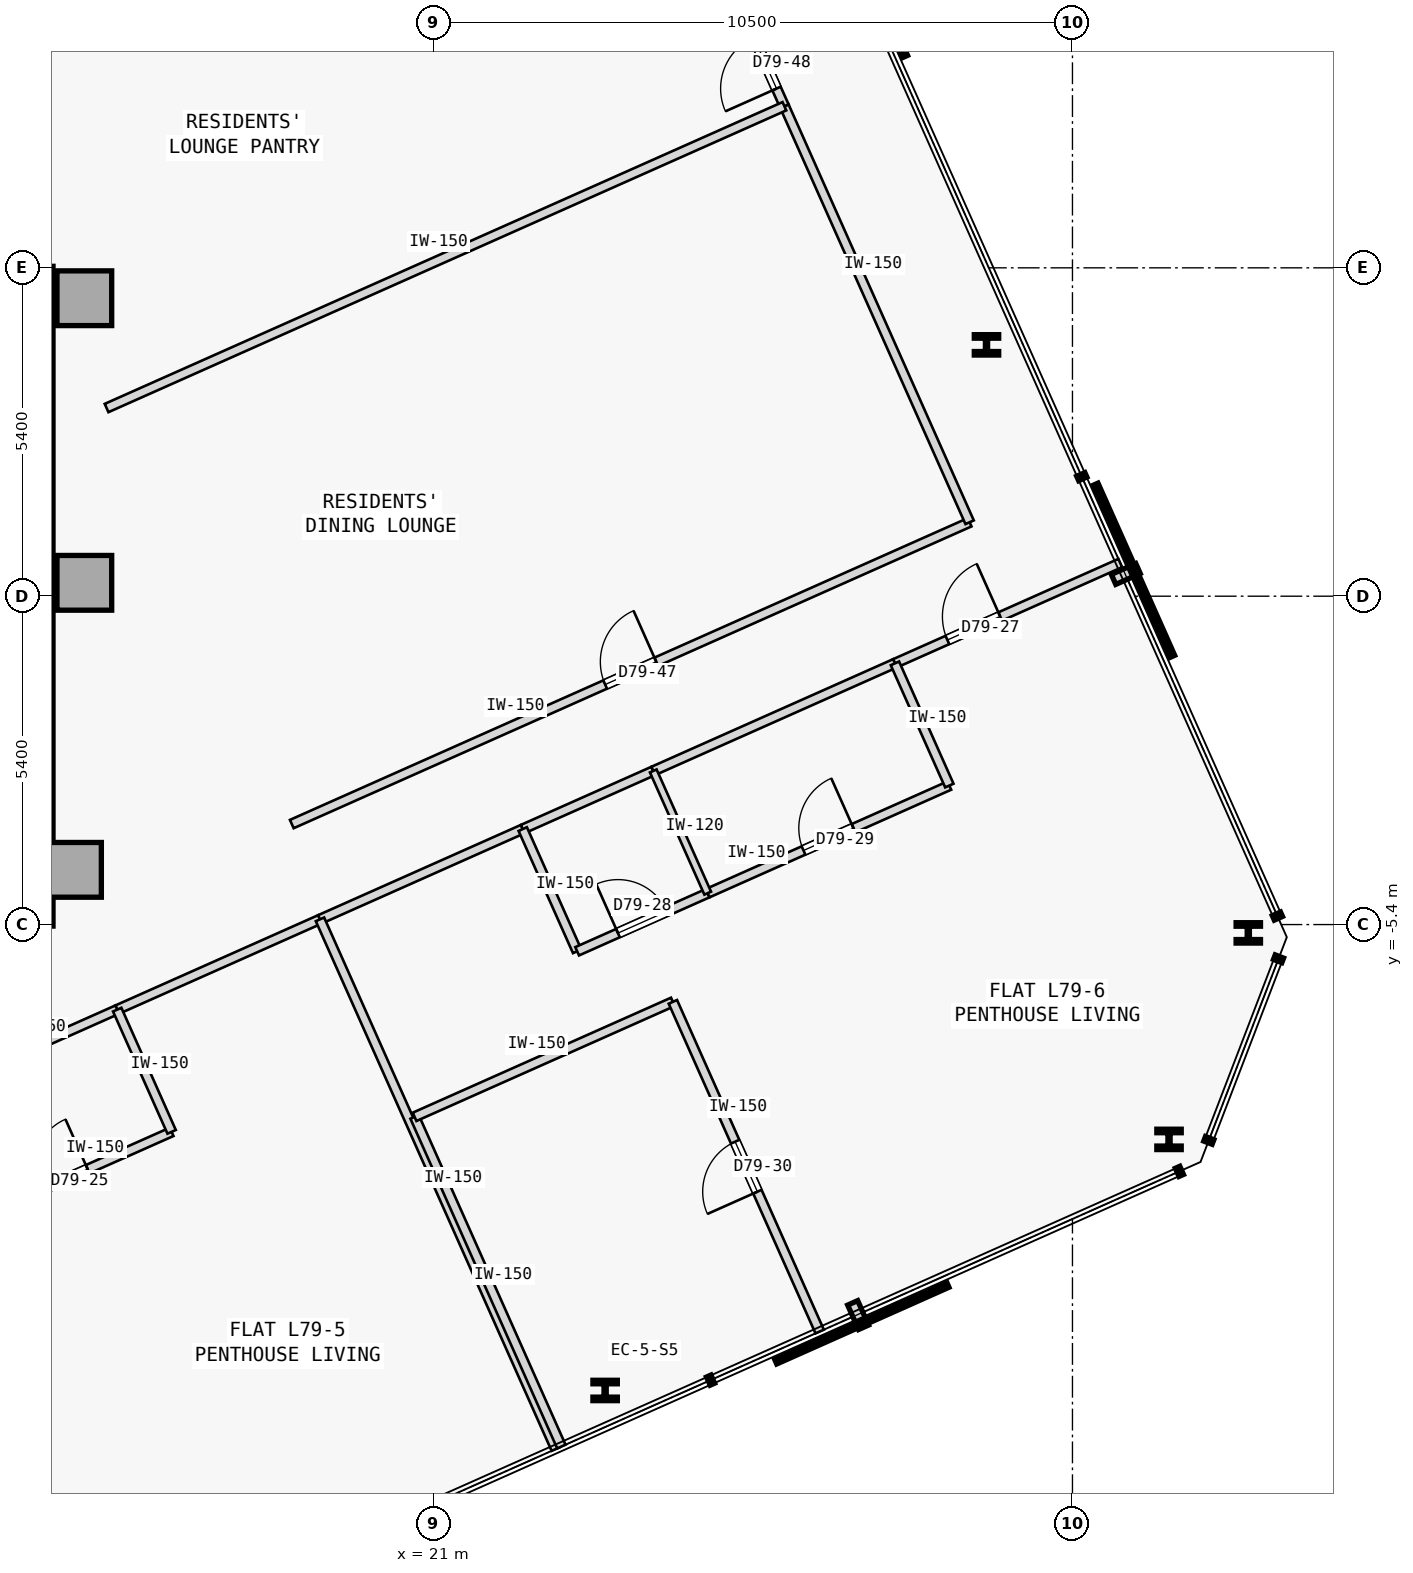
"""IFC4 building model, lengths in metres.
Left out: names, types, materials, properties, quantities, classifications, styles, units other than length and angle.
Written with IfcOpenShell. Run it as: python <this file> out.ifc"""

import sys

from ifc_helpers import new_model, si_unit, direction, frame, frame_2d, origin, origin_2d, place, context, subcontext, project, spatial, rectangle, i_section, extrude, element, fill, save


model = new_model("IFC4")
c1 = context("Model", 3, precision=1e-05, world=origin(), true_north=direction((0.0, 1.0)))
c2 = subcontext(c1, "Body", "Model", "MODEL_VIEW")
j1 = project(units=[si_unit("LENGTHUNIT", "METRE"), si_unit("PLANEANGLEUNIT", "RADIAN")], contexts=[c1])
p1 = place(None, origin())
s1 = spatial("IfcSite", under=j1, at=p1, CompositionType="ELEMENT")
p2 = place(p1, origin())
s2 = spatial("IfcBuilding", under=s1, at=p2, CompositionType="ELEMENT")
p3 = place(p2, frame((0.0, 0.0, 295.3)))
s3 = spatial("IfcBuildingStorey", under=s2, at=p3, CompositionType="ELEMENT", Elevation=295.3)
for number, where, z_axis, x_axis in (
    (1, (15.25, 4.9, 0.0), (0.0, 0.0, 1.0), (1.0, 0.0, 0.0)),
    (2, (15.25, 0.22, 0.0), (0.0, 0.0, 1.0), (1.0, 0.0, 0.0)),
    (3, (15.08, -4.5, 0.0), (0.0, 0.0, 1.0), (1.0, 0.0, 0.0)),
):
    element("IfcColumn", number, at=place(p3, frame(where, z_axis=z_axis, x_axis=x_axis)), inside=s3, PredefinedType="COLUMN", context=c2, shape_type="SweptSolid", body=[
        extrude(rectangle(XDim=0.9, YDim=0.9, at=origin_2d()), origin(), (0.0, 0.0, 1.0), 3.35),
    ])
p4 = place(p3, frame((14.56, -5.425, 0.0), z_axis=(0.0, 0.0, 1.0), x_axis=(0.0, 1.0, 0.0)))
e4 = element("IfcWall", 4, at=p4, inside=s3, PredefinedType="SHEAR", context=c2, shape_type="SweptSolid", body=[
    extrude(rectangle(XDim=10.85, YDim=0.35, at=frame_2d((5.425, 0.0))), origin(), (0.0, 0.0, 1.0), 3.125),
])
for number, where, z_axis, x_axis in (
    (5, (23.814, -13.062, 0.0), (0.0, 0.0, 1.0), (1.0, 0.0, 0.0)),
    (6, (33.088, -8.933, 0.0), (0.0, 0.0, 1.0), (1.0, 0.0, 0.0)),
    (7, (34.392, -5.537, 0.0), (0.0, 0.0, 1.0), (1.0, 0.0, 0.0)),
    (8, (30.086, 4.133, 0.0), (0.0, 0.0, 1.0), (1.0, 0.0, 0.0)),
):
    element("IfcColumn", number, at=place(p3, frame(where, z_axis=z_axis, x_axis=x_axis)), inside=s3, PredefinedType="COLUMN", context=c2, shape_type="SweptSolid", body=[
        extrude(i_section(OverallWidth=0.401, OverallDepth=0.335, WebThickness=0.036, FlangeThickness=0.058, FilletRadius=0.015, at=origin_2d()), origin(), (0.0, 0.0, 1.0), 3.35),
    ])
p5 = place(p3, frame((15.791, -6.799, 0.0), z_axis=(0.0, 0.0, 1.0), x_axis=(0.913543802, 0.40674036169, 0.0)))
e9 = element("IfcWall", 9, at=p5, inside=s3, PredefinedType="PARTITIONING", context=c2, shape_type="SweptSolid", body=[
    extrude(rectangle(XDim=3.65, YDim=0.15, at=frame_2d((1.825, 0.0))), origin(), (0.0, 0.0, 1.0), 3.125),
])
p6 = place(p3, frame((12.208, -8.394, 0.0), z_axis=(0.0, 0.0, 1.0), x_axis=(0.913539234326, 0.406750620585, 0.0)))
e10 = element("IfcWall", 10, at=p6, inside=s3, PredefinedType="PARTITIONING", context=c2, shape_type="SweptSolid", body=[
    extrude(rectangle(XDim=3.922, YDim=0.15, at=frame_2d((1.961, 0.0))), origin(), (0.0, 0.0, 1.0), 3.125),
])
p7 = place(p3, frame((19.125, -5.314, 0.0), z_axis=(0.0, 0.0, 1.0), x_axis=(0.913543802, 0.40674036169, 0.0)))
e11 = element("IfcWall", 11, at=p7, inside=s3, PredefinedType="PARTITIONING", context=c2, shape_type="SweptSolid", body=[
    extrude(rectangle(XDim=3.65, YDim=0.15, at=frame_2d((1.825, 0.0))), origin(), (0.0, 0.0, 1.0), 3.125),
])
p8 = place(p3, frame((28.581, -1.104, 0.0), z_axis=(0.0, 0.0, 1.0), x_axis=(0.91352836412, 0.406775033585, 0.0)))
e12 = element("IfcWall", 12, at=p8, inside=s3, PredefinedType="PARTITIONING", context=c2, shape_type="SweptSolid", body=[
    extrude(rectangle(XDim=4.056, YDim=0.15, at=frame_2d((2.028, 0.0))), origin(), (0.0, 0.0, 1.0), 3.125),
])
p9 = place(p8, frame((0.945, 0.0, 0.0)))
e13 = element("IfcOpeningElement", 13, at=p9, cuts=e12, PredefinedType="OPENING", context=c2, shape_type="SweptSolid", body=[
    extrude(rectangle(XDim=0.95, YDim=2.15, at=frame_2d((0.475, 1.075))), frame((0.0, 0.085, 0.0), z_axis=(0.0, -1.0, 0.0), x_axis=(1.0, 0.0, 0.0)), (0.0, 0.0, 1.0), 0.17),
])
p10 = place(p3, frame((22.46, -3.83, 0.0), z_axis=(0.0, 0.0, 1.0), x_axis=(0.913541436194, 0.406745675276, 0.0)))
e14 = element("IfcWall", 14, at=p10, inside=s3, PredefinedType="PARTITIONING", context=c2, shape_type="SweptSolid", body=[
    extrude(rectangle(XDim=2.35, YDim=0.15, at=frame_2d((1.175, 0.0))), origin(), (0.0, 0.0, 1.0), 3.125),
])
p11 = place(p3, frame((24.606, -2.874, 0.0), z_axis=(0.0, 0.0, 1.0), x_axis=(0.913554477336, 0.406716383908, 0.0)))
e15 = element("IfcWall", 15, at=p11, inside=s3, PredefinedType="PARTITIONING", context=c2, shape_type="SweptSolid", body=[
    extrude(rectangle(XDim=4.35, YDim=0.15, at=frame_2d((2.175, 0.0))), origin(), (0.0, 0.0, 1.0), 3.125),
])
p12 = place(p3, frame((18.662, -3.747, 0.0), z_axis=(0.0, 0.0, 1.0), x_axis=(0.91353989142, 0.406749144787, 0.0)))
e16 = element("IfcWall", 16, at=p12, inside=s3, PredefinedType="PARTITIONING", context=c2, shape_type="SweptSolid", body=[
    extrude(rectangle(XDim=12.202, YDim=0.15, at=frame_2d((6.101, 0.0))), origin(), (0.0, 0.0, 1.0), 3.125),
])
p13 = place(p12, frame((5.641, 0.0, 0.0)))
e17 = element("IfcOpeningElement", 17, at=p13, cuts=e16, PredefinedType="OPENING", context=c2, shape_type="SweptSolid", body=[
    extrude(rectangle(XDim=0.92, YDim=2.15, at=frame_2d((0.46, 1.075))), frame((0.0, 0.085, 0.0), z_axis=(0.0, -1.0, 0.0), x_axis=(1.0, 0.0, 0.0)), (0.0, 0.0, 1.0), 0.17),
])
p14 = place(p3, frame((29.809, 1.216, 0.0), z_axis=(0.0, 0.0, 1.0), x_axis=(-0.406719136744, 0.913553251763, 0.0)))
e18 = element("IfcWall", 18, at=p14, inside=s3, PredefinedType="PARTITIONING", context=c2, shape_type="SweptSolid", body=[
    extrude(rectangle(XDim=7.489, YDim=0.15, at=frame_2d((3.745, 0.0))), origin(), (0.0, 0.0, 1.0), 3.125),
])
p15 = place(p3, frame((26.763, 8.057, 0.0), z_axis=(0.0, 0.0, 1.0), x_axis=(-0.406851688687, 0.913494227356, 0.0)))
e19 = element("IfcWall", 19, at=p15, inside=s3, PredefinedType="PARTITIONING", context=c2, shape_type="SweptSolid", body=[
    extrude(rectangle(XDim=1.556, YDim=0.15, at=frame_2d((0.778, 0.0))), origin(), (0.0, 0.0, 1.0), 3.125),
])
p16 = place(p15, frame((0.318, 0.0, 0.0)))
e20 = element("IfcOpeningElement", 20, at=p16, cuts=e19, PredefinedType="OPENING", context=c2, shape_type="SweptSolid", body=[
    extrude(rectangle(XDim=0.92, YDim=2.15, at=frame_2d((0.46, 1.075))), frame((0.0, 0.085, 0.0), z_axis=(0.0, -1.0, 0.0), x_axis=(1.0, 0.0, 0.0)), (0.0, 0.0, 1.0), 0.17),
])
p17 = place(p3, frame((13.103, -10.404, 0.0), z_axis=(0.0, 0.0, 1.0), x_axis=(0.913549532696, 0.406727490232, 0.0)))
e21 = element("IfcWall", 21, at=p17, inside=s3, PredefinedType="PARTITIONING", context=c2, shape_type="SweptSolid", body=[
    extrude(rectangle(XDim=3.922, YDim=0.15, at=frame_2d((1.961, 0.0))), origin(), (0.0, 0.0, 1.0), 3.125),
])
p18 = place(p17, frame((1.511, 0.0, 0.0)))
e22 = element("IfcOpeningElement", 22, at=p18, cuts=e21, PredefinedType="OPENING", context=c2, shape_type="SweptSolid", body=[
    extrude(rectangle(XDim=0.9, YDim=2.15, at=frame_2d((0.45, 1.075))), frame((0.0, 0.085, 0.0), z_axis=(0.0, -1.0, 0.0), x_axis=(1.0, 0.0, 0.0)), (0.0, 0.0, 1.0), 0.17),
])
p19 = place(p3, frame((16.686, -8.809, 0.0), z_axis=(0.0, 0.0, 1.0), x_axis=(-0.406817905151, 0.913509273105, 0.0)))
e23 = element("IfcWall", 23, at=p19, inside=s3, PredefinedType="PARTITIONING", context=c2, shape_type="SweptSolid", body=[
    extrude(rectangle(XDim=2.2, YDim=0.15, at=frame_2d((1.1, 0.0))), origin(), (0.0, 0.0, 1.0), 3.125),
])
p20 = place(p3, frame((14.944, -17.613, 0.0), z_axis=(0.0, 0.0, 1.0), x_axis=(-0.406714717734, 0.913555219119, 0.0)))
e24 = element("IfcWall", 24, at=p20, inside=s3, PredefinedType="PARTITIONING", context=c2, shape_type="SweptSolid", body=[
    extrude(rectangle(XDim=5.935, YDim=0.15, at=frame_2d((2.967, 0.0))), origin(), (0.0, 0.0, 1.0), 2.675),
])
p21 = place(p20, frame((2.518, 0.0, 0.0)))
e25 = element("IfcOpeningElement", 25, at=p21, cuts=e24, PredefinedType="OPENING", context=c2, shape_type="SweptSolid", body=[
    extrude(rectangle(XDim=0.9, YDim=2.15, at=frame_2d((0.45, 1.075))), frame((0.0, 0.085, 0.0), z_axis=(0.0, -1.0, 0.0), x_axis=(1.0, 0.0, 0.0)), (0.0, 0.0, 1.0), 0.17),
])
p22 = place(p3, frame((23.003, -14.025, 0.0), z_axis=(0.0, 0.0, 1.0), x_axis=(-0.406729927653, 0.913548447512, 0.0)))
e26 = element("IfcWall", 26, at=p22, inside=s3, PredefinedType="PARTITIONING", context=c2, shape_type="SweptSolid", body=[
    extrude(rectangle(XDim=9.535, YDim=0.15, at=frame_2d((4.768, 0.0))), origin(), (0.0, 0.0, 1.0), 3.125),
])
p23 = place(p3, frame((23.354, -5.839, 0.0), z_axis=(0.0, 0.0, 1.0), x_axis=(-0.406725294076, 0.913550510459, 0.0)))
e27 = element("IfcWall", 27, at=p23, inside=s3, PredefinedType="PARTITIONING", context=c2, shape_type="SweptSolid", body=[
    extrude(rectangle(XDim=2.2, YDim=0.15, at=frame_2d((1.1, 0.0))), origin(), (0.0, 0.0, 1.0), 3.125),
])
p24 = place(p3, frame((23.354, -5.839, 0.0), z_axis=(0.0, 0.0, 1.0), x_axis=(0.913558622212, 0.406707073682, 0.0)))
e28 = element("IfcWall", 28, at=p24, inside=s3, PredefinedType="PARTITIONING", context=c2, shape_type="SweptSolid", body=[
    extrude(rectangle(XDim=2.35, YDim=0.15, at=frame_2d((1.175, 0.0))), origin(), (0.0, 0.0, 1.0), 3.125),
])
p25 = place(p24, frame((0.735, 0.0, 0.0)))
e29 = element("IfcOpeningElement", 29, at=p25, cuts=e28, PredefinedType="OPENING", context=c2, shape_type="SweptSolid", body=[
    extrude(rectangle(XDim=0.88, YDim=2.15, at=frame_2d((0.44, 1.075))), frame((0.0, 0.085, 0.0), z_axis=(0.0, -1.0, 0.0), x_axis=(1.0, 0.0, 0.0)), (0.0, 0.0, 1.0), 0.17),
])
p26 = place(p3, frame((25.501, -4.884, 0.0), z_axis=(0.0, 0.0, 1.0), x_axis=(0.913545193015, 0.406737237438, 0.0)))
e30 = element("IfcWall", 30, at=p26, inside=s3, PredefinedType="PARTITIONING", context=c2, shape_type="SweptSolid", body=[
    extrude(rectangle(XDim=4.35, YDim=0.15, at=frame_2d((2.175, 0.0))), origin(), (0.0, 0.0, 1.0), 3.125),
])
p27 = place(p26, frame((1.725, 0.0, 0.0)))
e31 = element("IfcOpeningElement", 31, at=p27, cuts=e30, PredefinedType="OPENING", context=c2, shape_type="SweptSolid", body=[
    extrude(rectangle(XDim=0.9, YDim=2.15, at=frame_2d((0.45, 1.075))), frame((0.0, 0.085, 0.0), z_axis=(0.0, -1.0, 0.0), x_axis=(1.0, 0.0, 0.0)), (0.0, 0.0, 1.0), 0.17),
])
p28 = place(p3, frame((29.475, -3.114, 0.0), z_axis=(0.0, 0.0, 1.0), x_axis=(-0.406725294076, 0.913550510459, 0.0)))
e32 = element("IfcWall", 32, at=p28, inside=s3, PredefinedType="PARTITIONING", context=c2, shape_type="SweptSolid", body=[
    extrude(rectangle(XDim=2.2, YDim=0.15, at=frame_2d((1.1, 0.0))), origin(), (0.0, 0.0, 1.0), 3.125),
])
p29 = place(p3, frame((23.095, -13.984, 0.0), z_axis=(0.0, 0.0, 1.0), x_axis=(-0.406749048544, 0.913539934271, 0.0)))
e33 = element("IfcWall", 33, at=p29, inside=s3, PredefinedType="PARTITIONING", context=c2, shape_type="SweptSolid", body=[
    extrude(rectangle(XDim=5.935, YDim=0.15, at=frame_2d((2.968, 0.0))), origin(), (0.0, 0.0, 1.0), 3.125),
])
p30 = place(p3, frame((20.681, -8.562, 0.0), z_axis=(0.0, 0.0, 1.0), x_axis=(0.91354505039, 0.40673755778, 0.0)))
e34 = element("IfcWall", 34, at=p30, inside=s3, PredefinedType="PARTITIONING", context=c2, shape_type="SweptSolid", body=[
    extrude(rectangle(XDim=4.65, YDim=0.15, at=frame_2d((2.325, 0.0))), origin(), (0.0, 0.0, 1.0), 3.125),
])
p31 = place(p3, frame((27.343, -12.093, 0.0), z_axis=(0.0, 0.0, 1.0), x_axis=(-0.406714717734, 0.913555219119, 0.0)))
e35 = element("IfcWall", 35, at=p31, inside=s3, PredefinedType="PARTITIONING", context=c2, shape_type="SweptSolid", body=[
    extrude(rectangle(XDim=5.935, YDim=0.15, at=frame_2d((2.967, 0.0))), origin(), (0.0, 0.0, 1.0), 3.125),
])
p32 = place(p31, frame((2.518, 0.0, 0.0)))
e36 = element("IfcOpeningElement", 36, at=p32, cuts=e35, PredefinedType="OPENING", context=c2, shape_type="SweptSolid", body=[
    extrude(rectangle(XDim=0.9, YDim=2.15, at=frame_2d((0.45, 1.075))), frame((0.0, 0.085, 0.0), z_axis=(0.0, -1.0, 0.0), x_axis=(1.0, 0.0, 0.0)), (0.0, 0.0, 1.0), 0.17),
])
p33 = place(p3, frame((25.501, -4.884, 0.0), z_axis=(0.0, 0.0, 1.0), x_axis=(-0.406817905151, 0.913509273105, 0.0)))
e37 = element("IfcWall", 37, at=p33, inside=s3, PredefinedType="PARTITIONING", context=c2, shape_type="SweptSolid", body=[
    extrude(rectangle(XDim=2.2, YDim=0.12, at=frame_2d((1.1, 0.0))), origin(), (0.0, 0.0, 1.0), 3.125),
])
p34 = place(p3, frame((15.616, 3.094, 0.0), z_axis=(0.0, 0.0, 1.0), x_axis=(0.913550635989, 0.40672501212, 0.0)))
e38 = element("IfcWall", 38, at=p34, inside=s3, PredefinedType="PARTITIONING", context=c2, shape_type="SweptSolid", body=[
    extrude(rectangle(XDim=12.202, YDim=0.15, at=frame_2d((6.101, 0.0))), origin(), (0.0, 0.0, 1.0), 3.125),
])
p35 = place(p3, frame((13.018, 8.93, 0.0), z_axis=(0.0, 0.0, 1.0), x_axis=(0.913551014388, 0.406724162191, 0.0)))
e39 = element("IfcWall", 39, at=p35, inside=s3, PredefinedType="PARTITIONING", context=c2, shape_type="SweptSolid", body=[
    extrude(rectangle(XDim=14.192, YDim=0.15, at=frame_2d((7.096, 0.0))), origin(), (0.0, 0.0, 1.0), 3.125),
])
p36 = place(p35, frame((6.636, 0.0, 0.0)))
e40 = element("IfcOpeningElement", 40, at=p36, cuts=e39, PredefinedType="OPENING", context=c2, shape_type="SweptSolid", body=[
    extrude(rectangle(XDim=0.92, YDim=2.15, at=frame_2d((0.46, 1.075))), frame((0.0, 0.085, 0.0), z_axis=(0.0, -1.0, 0.0), x_axis=(1.0, 0.0, 0.0)), (0.0, 0.0, 1.0), 0.17),
])
p37 = place(p18, origin())
e41 = element("IfcDoor", 41, at=p37, inside=s3, OperationType="SINGLE_SWING_RIGHT", PredefinedType="DOOR", context=c2, shape_type="SweptSolid", body=[
    extrude(rectangle(XDim=0.9, YDim=2.15, at=frame_2d((0.45, 1.075))), frame((0.0, 0.025, 0.0), z_axis=(0.0, -1.0, 0.0), x_axis=(1.0, 0.0, 0.0)), (0.0, 0.0, 1.0), 0.05),
])
fill(e22, e41)
p38 = place(p9, origin())
e42 = element("IfcDoor", 42, at=p38, inside=s3, OperationType="SINGLE_SWING_RIGHT", PredefinedType="DOOR", context=c2, shape_type="SweptSolid", body=[
    extrude(rectangle(XDim=0.95, YDim=2.15, at=frame_2d((0.475, 1.075))), frame((0.0, 0.025, 0.0), z_axis=(0.0, -1.0, 0.0), x_axis=(1.0, 0.0, 0.0)), (0.0, 0.0, 1.0), 0.05),
])
fill(e13, e42)
p39 = place(p25, origin())
e43 = element("IfcDoor", 43, at=p39, inside=s3, OperationType="SINGLE_SWING_LEFT", PredefinedType="DOOR", context=c2, shape_type="SweptSolid", body=[
    extrude(rectangle(XDim=0.88, YDim=2.15, at=frame_2d((0.44, 1.075))), frame((0.0, 0.025, 0.0), z_axis=(0.0, -1.0, 0.0), x_axis=(1.0, 0.0, 0.0)), (0.0, 0.0, 1.0), 0.05),
])
fill(e29, e43)
p40 = place(p27, origin())
e44 = element("IfcDoor", 44, at=p40, inside=s3, OperationType="SINGLE_SWING_RIGHT", PredefinedType="DOOR", context=c2, shape_type="SweptSolid", body=[
    extrude(rectangle(XDim=0.9, YDim=2.15, at=frame_2d((0.45, 1.075))), frame((0.0, 0.025, 0.0), z_axis=(0.0, -1.0, 0.0), x_axis=(1.0, 0.0, 0.0)), (0.0, 0.0, 1.0), 0.05),
])
fill(e31, e44)
p41 = place(p32, origin())
e45 = element("IfcDoor", 45, at=p41, inside=s3, OperationType="SINGLE_SWING_LEFT", PredefinedType="DOOR", context=c2, shape_type="SweptSolid", body=[
    extrude(rectangle(XDim=0.9, YDim=2.15, at=frame_2d((0.45, 1.075))), frame((0.0, 0.025, 0.0), z_axis=(0.0, -1.0, 0.0), x_axis=(1.0, 0.0, 0.0)), (0.0, 0.0, 1.0), 0.05),
])
fill(e36, e45)
p42 = place(p13, origin())
e46 = element("IfcDoor", 46, at=p42, inside=s3, OperationType="SINGLE_SWING_RIGHT", PredefinedType="DOOR", context=c2, shape_type="SweptSolid", body=[
    extrude(rectangle(XDim=0.92, YDim=2.15, at=frame_2d((0.46, 1.075))), frame((0.0, 0.025, 0.0), z_axis=(0.0, -1.0, 0.0), x_axis=(1.0, 0.0, 0.0)), (0.0, 0.0, 1.0), 0.05),
])
fill(e17, e46)
p43 = place(p16, origin())
e47 = element("IfcDoor", 47, at=p43, inside=s3, OperationType="SINGLE_SWING_LEFT", PredefinedType="DOOR", context=c2, shape_type="SweptSolid", body=[
    extrude(rectangle(XDim=0.92, YDim=2.15, at=frame_2d((0.46, 1.075))), frame((0.0, 0.025, 0.0), z_axis=(0.0, -1.0, 0.0), x_axis=(1.0, 0.0, 0.0)), (0.0, 0.0, 1.0), 0.05),
])
fill(e20, e47)
save(model, sys.argv[1])
